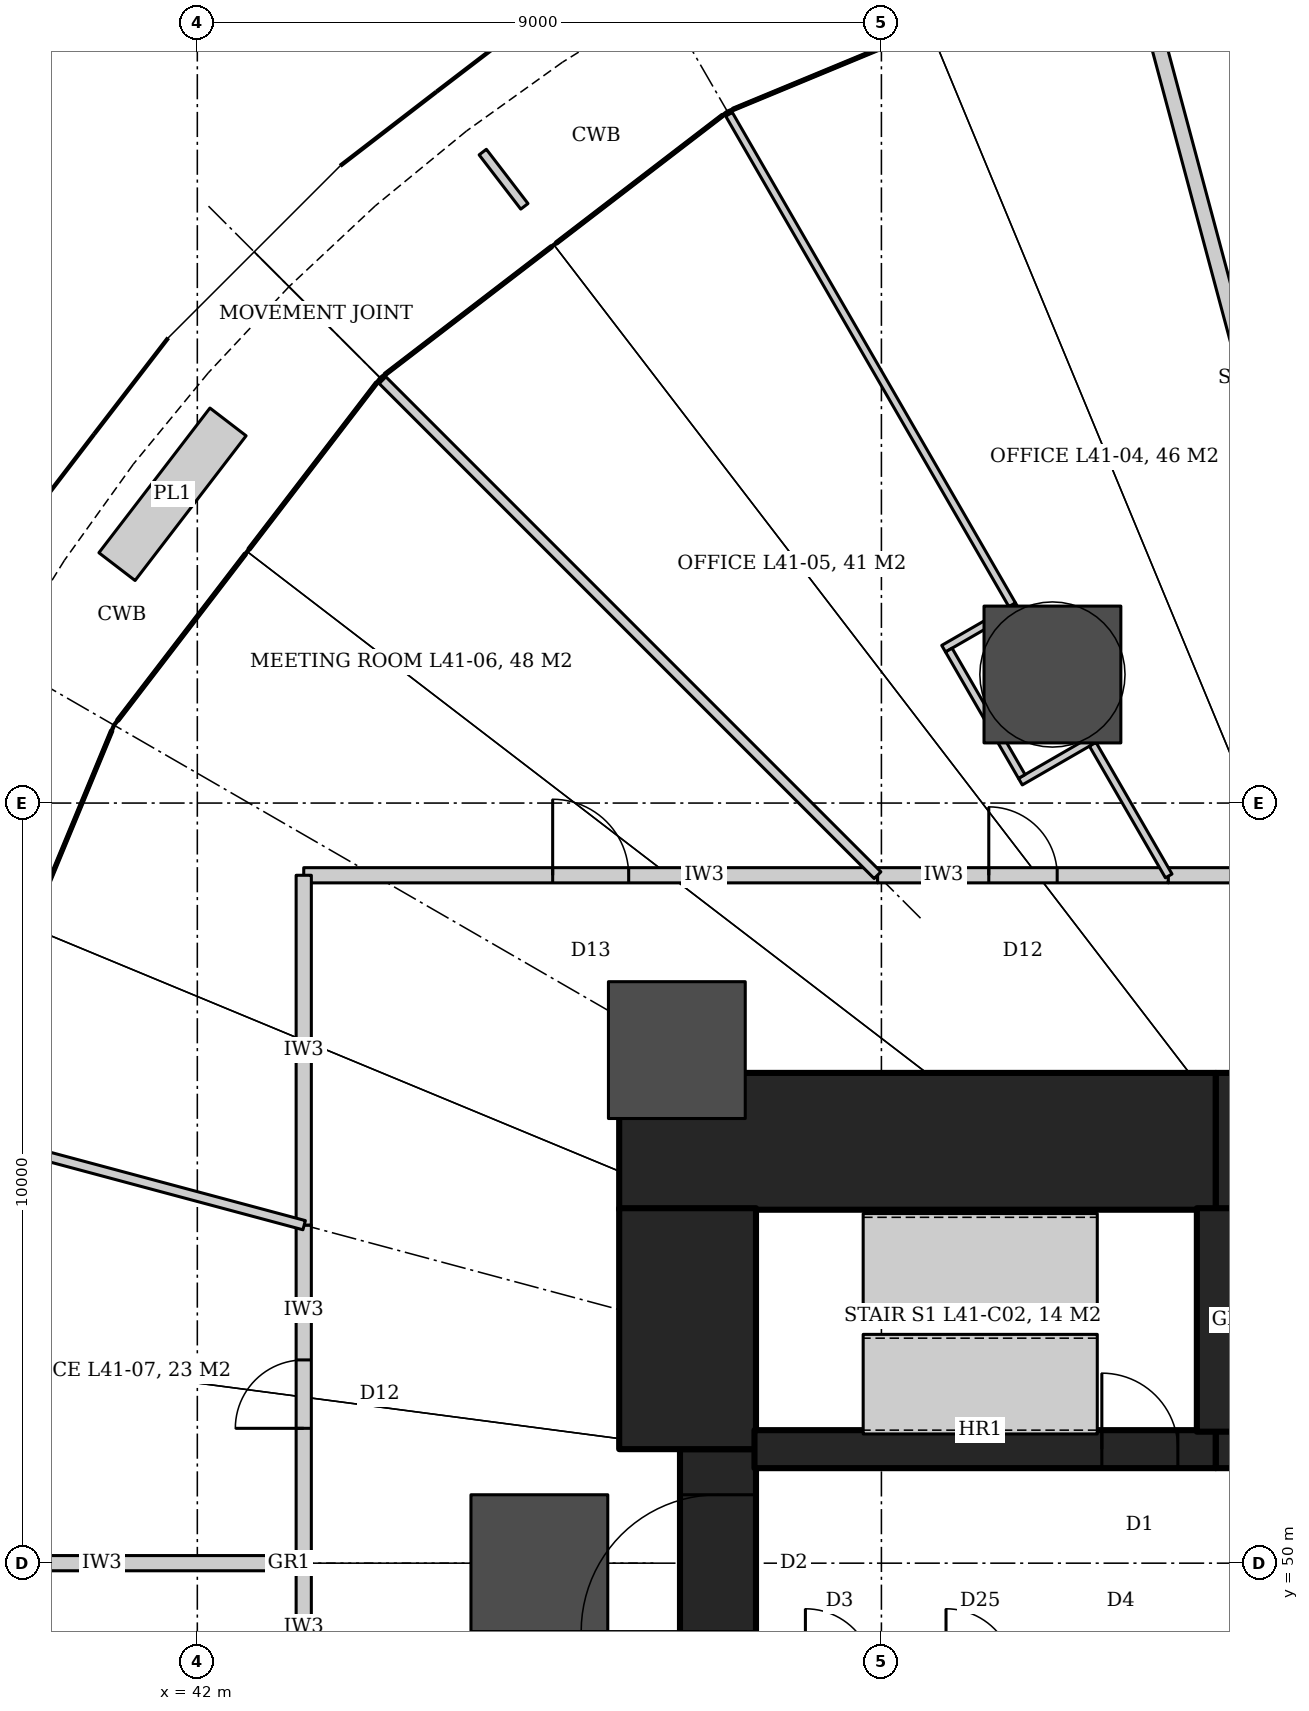
"""IFC4 building model, lengths in metres.
Left out: names, types, materials, properties, quantities, classifications, styles, units other than length and angle.
Written with IfcOpenShell. Run it as: python <this file> out.ifc"""

import sys

from ifc_helpers import new_model, si_unit, direction, frame, frame_2d, origin, origin_2d, place, context, subcontext, project, spatial, rectangle, hollow_circle, extrude, element, fill, save


model = new_model("IFC4")
c1 = context("Model", 3, precision=1e-05, world=origin(), true_north=direction((0.0, 1.0)))
c2 = subcontext(c1, "Body", "Model", "MODEL_VIEW")
j1 = project(units=[si_unit("LENGTHUNIT", "METRE"), si_unit("PLANEANGLEUNIT", "RADIAN")], contexts=[c1])
p1 = place(None, origin())
s1 = spatial("IfcSite", under=j1, at=p1, CompositionType="ELEMENT")
p2 = place(p1, origin())
s2 = spatial("IfcBuilding", under=s1, at=p2, CompositionType="ELEMENT")
p3 = place(p2, frame((0.0, 0.0, 173.0)))
s3 = spatial("IfcBuildingStorey", under=s2, at=p3, CompositionType="ELEMENT", Elevation=173.0)
p4 = place(p3, frame((47.55, 55.55, 0.0), z_axis=(0.0, 0.0, 1.0), x_axis=(1.0, 0.0, 0.0)))
e1 = element("IfcWall", 1, at=p4, inside=s3, PredefinedType="SHEAR", context=c2, shape_type="SweptSolid", body=[
    extrude(rectangle(XDim=7.85, YDim=1.8, at=frame_2d((3.925, 0.0))), origin(), (0.0, 0.0, 1.0), 4.2),
])
p5 = place(p3, frame((55.4, 55.55, 0.0), z_axis=(0.0, 0.0, 1.0), x_axis=(1.0, 0.0, 0.0)))
e2 = element("IfcWall", 2, at=p5, inside=s3, PredefinedType="SHEAR", context=c2, shape_type="SweptSolid", body=[
    extrude(rectangle(XDim=9.2, YDim=1.8, at=frame_2d((4.6, 0.0))), origin(), (0.0, 0.0, 1.0), 4.2),
])
p6 = place(p3, frame((48.45, 48.5, 0.0), z_axis=(0.0, 0.0, 1.0), x_axis=(0.0, 1.0, 0.0)))
e3 = element("IfcWall", 3, at=p6, inside=s3, PredefinedType="SHEAR", context=c2, shape_type="SweptSolid", body=[
    extrude(rectangle(XDim=3.0, YDim=1.8, at=frame_2d((1.5, 0.0))), origin(), (0.0, 0.0, 1.0), 4.2),
])
p7 = place(p6, frame((0.6, 0.0, 0.0)))
e4 = element("IfcOpeningElement", 4, at=p7, cuts=e3, PredefinedType="OPENING", context=c2, shape_type="SweptSolid", body=[
    extrude(rectangle(XDim=1.8, YDim=2.1, at=frame_2d((0.9, 1.05))), frame((0.0, 0.91, 0.0), z_axis=(0.0, -1.0, 0.0), x_axis=(1.0, 0.0, 0.0)), (0.0, 0.0, 1.0), 1.82),
])
p8 = place(p3, frame((48.45, 51.5, 0.0), z_axis=(0.0, 0.0, 1.0), x_axis=(0.0, 1.0, 0.0)))
e5 = element("IfcWall", 5, at=p8, inside=s3, PredefinedType="SHEAR", context=c2, shape_type="SweptSolid", body=[
    extrude(rectangle(XDim=3.17, YDim=1.8, at=frame_2d((1.585, 0.0))), origin(), (0.0, 0.0, 1.0), 4.2),
])
p9 = place(p3, frame((49.33, 51.5, 0.0), z_axis=(0.0, 0.0, 1.0), x_axis=(1.0, 0.0, 0.0)))
e6 = element("IfcWall", 6, at=p9, inside=s3, PredefinedType="SHEAR", context=c2, shape_type="SweptSolid", body=[
    extrude(rectangle(XDim=6.07, YDim=0.4, at=frame_2d((3.035, 0.0))), origin(), (0.0, 0.0, 1.0), 4.2),
])
p10 = place(p9, frame((4.57, 0.0, 0.0)))
e7 = element("IfcOpeningElement", 7, at=p10, cuts=e6, PredefinedType="OPENING", context=c2, shape_type="SweptSolid", body=[
    extrude(rectangle(XDim=1.0, YDim=2.1, at=frame_2d((0.5, 1.05))), frame((0.0, 0.21, 0.0), z_axis=(0.0, -1.0, 0.0), x_axis=(1.0, 0.0, 0.0)), (0.0, 0.0, 1.0), 0.42),
])
p11 = place(p3, frame((55.4, 51.5, 0.0), z_axis=(0.0, 0.0, 1.0), x_axis=(1.0, 0.0, 0.0)))
e8 = element("IfcWall", 8, at=p11, inside=s3, PredefinedType="SHEAR", context=c2, shape_type="SweptSolid", body=[
    extrude(rectangle(XDim=9.2, YDim=0.4, at=frame_2d((4.6, 0.0))), origin(), (0.0, 0.0, 1.0), 4.2),
])
p12 = place(p11, frame((1.7, 0.0, 0.0)))
e9 = element("IfcOpeningElement", 9, at=p12, cuts=e8, PredefinedType="OPENING", context=c2, shape_type="SweptSolid", body=[
    extrude(rectangle(XDim=0.8, YDim=2.1, at=frame_2d((0.4, 1.05))), frame((0.0, 0.21, 0.0), z_axis=(0.0, -1.0, 0.0), x_axis=(1.0, 0.0, 0.0)), (0.0, 0.0, 1.0), 0.42),
])
p13 = place(p11, frame((4.85, 0.0, 0.0)))
e10 = element("IfcOpeningElement", 10, at=p13, cuts=e8, PredefinedType="OPENING", context=c2, shape_type="SweptSolid", body=[
    extrude(rectangle(XDim=0.8, YDim=2.1, at=frame_2d((0.4, 1.05))), frame((0.0, 0.21, 0.0), z_axis=(0.0, -1.0, 0.0), x_axis=(1.0, 0.0, 0.0)), (0.0, 0.0, 1.0), 0.42),
])
p14 = place(p11, frame((7.35, 0.0, 0.0)))
e11 = element("IfcOpeningElement", 11, at=p14, cuts=e8, PredefinedType="OPENING", context=c2, shape_type="SweptSolid", body=[
    extrude(rectangle(XDim=0.8, YDim=2.1, at=frame_2d((0.4, 1.05))), frame((0.0, 0.21, 0.0), z_axis=(0.0, -1.0, 0.0), x_axis=(1.0, 0.0, 0.0)), (0.0, 0.0, 1.0), 0.42),
])
p15 = place(p3, frame((55.4, 51.68, 0.0), z_axis=(0.0, 0.0, 1.0), x_axis=(0.0, 1.0, 0.0)))
e12 = element("IfcWall", 12, at=p15, inside=s3, PredefinedType="SHEAR", context=c2, shape_type="SweptSolid", body=[
    extrude(rectangle(XDim=2.99, YDim=0.4, at=frame_2d((1.495, 0.0))), origin(), (0.0, 0.0, 1.0), 4.2),
])
for number, where, z_axis, x_axis in (
    (13, (53.25, 61.691, 0.0), (0.0, 0.0, 1.0), (1.0, 0.0, 0.0)),
    (14, (48.309, 56.75, 0.0), (0.0, 0.0, 1.0), (1.0, 0.0, 0.0)),
    (15, (46.5, 50.0, 0.0), (0.0, 0.0, 1.0), (1.0, 0.0, 0.0)),
):
    element("IfcColumn", number, at=place(p3, frame(where, z_axis=z_axis, x_axis=x_axis)), inside=s3, PredefinedType="COLUMN", context=c2, shape_type="SweptSolid", body=[
        extrude(hollow_circle(Radius=0.508, WallThickness=0.05, at=origin_2d()), origin(), (0.0, 0.0, 1.0), 4.2),
    ])
p16 = place(p3, frame((43.4, 59.05, 0.0), z_axis=(0.0, 0.0, 1.0), x_axis=(1.0, 0.0, 0.0)))
e16 = element("IfcWall", 16, at=p16, inside=s3, PredefinedType="PARTITIONING", context=c2, shape_type="SweptSolid", body=[
    extrude(rectangle(XDim=7.55, YDim=0.2, at=frame_2d((3.775, 0.0))), origin(), (0.0, 0.0, 1.0), 3.012),
])
p17 = place(p3, frame((50.95, 59.05, 0.0), z_axis=(0.0, 0.0, 1.0), x_axis=(1.0, 0.0, 0.0)))
e17 = element("IfcWall", 17, at=p17, inside=s3, PredefinedType="PARTITIONING", context=c2, shape_type="SweptSolid", body=[
    extrude(rectangle(XDim=3.825, YDim=0.2, at=frame_2d((1.913, 0.0))), origin(), (0.0, 0.0, 1.0), 3.02),
])
p18 = place(p17, frame((1.462, 0.0, 0.0)))
e18 = element("IfcOpeningElement", 18, at=p18, cuts=e17, PredefinedType="OPENING", context=c2, shape_type="SweptSolid", body=[
    extrude(rectangle(XDim=0.9, YDim=2.4, at=frame_2d((0.45, 1.2))), frame((0.0, 0.11, 0.0), z_axis=(0.0, -1.0, 0.0), x_axis=(1.0, 0.0, 0.0)), (0.0, 0.0, 1.0), 0.22),
])
p19 = place(p3, frame((54.775, 59.05, 0.0), z_axis=(0.0, 0.0, 1.0), x_axis=(1.0, 0.0, 0.0)))
e19 = element("IfcWall", 19, at=p19, inside=s3, PredefinedType="PARTITIONING", context=c2, shape_type="SweptSolid", body=[
    extrude(rectangle(XDim=2.8, YDim=0.2, at=frame_2d((1.4, 0.0))), origin(), (0.0, 0.0, 1.0), 3.04),
])
p20 = place(p19, frame((0.95, 0.0, 0.0)))
e20 = element("IfcOpeningElement", 20, at=p20, cuts=e19, PredefinedType="OPENING", context=c2, shape_type="SweptSolid", body=[
    extrude(rectangle(XDim=0.9, YDim=2.4, at=frame_2d((0.45, 1.2))), frame((0.0, 0.11, 0.0), z_axis=(0.0, -1.0, 0.0), x_axis=(1.0, 0.0, 0.0)), (0.0, 0.0, 1.0), 0.22),
])
p21 = place(p3, frame((43.4, 45.552, 0.0), z_axis=(0.0, 0.0, 1.0), x_axis=(0.0, 1.0, 0.0)))
e21 = element("IfcWall", 21, at=p21, inside=s3, PredefinedType="PARTITIONING", context=c2, shape_type="SweptSolid", body=[
    extrude(rectangle(XDim=4.448, YDim=0.2, at=frame_2d((2.224, 0.0))), origin(), (0.0, 0.0, 1.0), 3.012),
])
p22 = place(p21, frame((1.424, 0.0, 0.0)))
e22 = element("IfcOpeningElement", 22, at=p22, cuts=e21, PredefinedType="OPENING", context=c2, shape_type="SweptSolid", body=[
    extrude(rectangle(XDim=1.6, YDim=2.4, at=frame_2d((0.8, 1.2))), frame((0.0, 0.11, 0.0), z_axis=(0.0, -1.0, 0.0), x_axis=(1.0, 0.0, 0.0)), (0.0, 0.0, 1.0), 0.22),
])
p23 = place(p3, frame((43.4, 50.0, 0.0), z_axis=(0.0, 0.0, 1.0), x_axis=(0.0, 1.0, 0.0)))
e23 = element("IfcWall", 23, at=p23, inside=s3, PredefinedType="PARTITIONING", context=c2, shape_type="SweptSolid", body=[
    extrude(rectangle(XDim=9.05, YDim=0.2, at=frame_2d((4.525, 0.0))), origin(), (0.0, 0.0, 1.0), 3.012),
])
p24 = place(p23, frame((4.025, 0.0, 0.0)))
e24 = element("IfcOpeningElement", 24, at=p24, cuts=e23, PredefinedType="OPENING", context=c2, shape_type="SweptSolid", body=[
    extrude(rectangle(XDim=1.0, YDim=2.4, at=frame_2d((0.5, 1.2))), frame((0.0, 0.11, 0.0), z_axis=(0.0, -1.0, 0.0), x_axis=(1.0, 0.0, 0.0)), (0.0, 0.0, 1.0), 0.22),
])
p25 = place(p3, frame((57.577, 59.041, 0.0), z_axis=(0.0, 0.0, 1.0), x_axis=(-0.258808436689, 0.965928668743, 0.0)))
e25 = element("IfcWall", 25, at=p25, inside=s3, PredefinedType="PARTITIONING", context=c2, shape_type="SweptSolid", body=[
    extrude(rectangle(XDim=12.65, YDim=0.2, at=frame_2d((6.325, 0.0))), origin(), (0.0, 0.0, 1.0), 3.012),
])
for number, where, z_axis, x_axis in (
    (26, (53.602, 61.181, 0.0), (0.0, 0.0, 1.0), (-0.866, -0.5, 0.0)),
    (27, (52.984, 62.251, 0.0), (0.0, 0.0, 1.0), (-0.866, -0.5, 0.0)),
):
    element("IfcWall", number, at=place(p3, frame(where, z_axis=z_axis, x_axis=x_axis)), inside=s3, PredefinedType="PARTITIONING", context=c2, shape_type="SweptSolid", body=[
        extrude(rectangle(XDim=0.728, YDim=0.1, at=frame_2d((0.364, 0.0))), origin(), (0.0, 0.0, 1.0), 3.012),
    ])
p26 = place(p3, frame((52.99, 60.885, 0.0), z_axis=(0.0, 0.0, 1.0), x_axis=(-0.499976747263, 0.866038828342, 0.0)))
e28 = element("IfcWall", 28, at=p26, inside=s3, PredefinedType="PARTITIONING", context=c2, shape_type="SweptSolid", body=[
    extrude(rectangle(XDim=1.136, YDim=0.1, at=frame_2d((0.568, 0.0))), origin(), (0.0, 0.0, 1.0), 3.012),
])
p27 = place(p3, frame((54.78, 59.041, 0.0), z_axis=(0.0, 0.0, 1.0), x_axis=(-0.500014005679, 0.866017317451, 0.0)))
e29 = element("IfcWall", 29, at=p27, inside=s3, PredefinedType="PARTITIONING", context=c2, shape_type="SweptSolid", body=[
    extrude(rectangle(XDim=2.392, YDim=0.1, at=frame_2d((1.196, 0.0))), origin(), (0.0, 0.0, 1.0), 3.04),
])
p28 = place(p3, frame((52.916, 62.27, 0.0), z_axis=(0.0, 0.0, 1.0), x_axis=(-0.499997422768, 0.866026891745, 0.0)))
e30 = element("IfcWall", 30, at=p28, inside=s3, PredefinedType="PARTITIONING", context=c2, shape_type="SweptSolid", body=[
    extrude(rectangle(XDim=7.942, YDim=0.1, at=frame_2d((3.971, 0.0))), origin(), (0.0, 0.0, 1.0), 3.012),
])
p29 = place(p3, frame((50.949, 59.051, 0.0), z_axis=(0.0, 0.0, 1.0), x_axis=(-0.707106781187, 0.707106781187, 0.0)))
e31 = element("IfcWall", 31, at=p29, inside=s3, PredefinedType="PARTITIONING", context=c2, shape_type="SweptSolid", body=[
    extrude(rectangle(XDim=9.31, YDim=0.125, at=frame_2d((4.655, 0.0))), origin(), (0.0, 0.0, 1.0), 3.012),
])
p30 = place(p3, frame((43.4, 50.0, 0.0), z_axis=(0.0, 0.0, 1.0), x_axis=(-1.0, 0.0, 0.0)))
e32 = element("IfcWall", 32, at=p30, inside=s3, PredefinedType="PARTITIONING", context=c2, shape_type="SweptSolid", body=[
    extrude(rectangle(XDim=1.81, YDim=0.125, at=frame_2d((0.905, 0.0))), origin(), (0.0, 0.0, 1.0), 3.012),
])
p31 = place(p3, frame((41.45, 50.0, 0.0), z_axis=(0.0, 0.0, 1.0), x_axis=(-0.444556644785, -0.895750740763, 0.0)))
e33 = element("IfcWall", 33, at=p31, inside=s3, PredefinedType="SOLIDWALL", context=c2, shape_type="SweptSolid", body=[
    extrude(rectangle(XDim=6.4, YDim=0.25, at=frame_2d((3.2, 0.0))), origin(), (0.0, 0.0, 1.0), 4.04),
])
p32 = place(p31, frame((2.3, 0.0, 0.0)))
e34 = element("IfcOpeningElement", 34, at=p32, cuts=e33, PredefinedType="OPENING", context=c2, shape_type="SweptSolid", body=[
    extrude(rectangle(XDim=1.8, YDim=2.4, at=frame_2d((0.9, 1.2))), frame((0.0, 0.135, 0.0), z_axis=(0.0, -1.0, 0.0), x_axis=(1.0, 0.0, 0.0)), (0.0, 0.0, 1.0), 0.27),
])
p33 = place(p31, frame((0.7, 0.0, 0.0)))
e35 = element("IfcOpeningElement", 35, at=p33, cuts=e33, PredefinedType="OPENING", context=c2, shape_type="SweptSolid", body=[
    extrude(rectangle(XDim=1.2, YDim=2.4, at=frame_2d((0.6, 1.2))), frame((0.0, 0.135, 0.0), z_axis=(0.0, -1.0, 0.0), x_axis=(1.0, 0.0, 0.0)), (0.0, 0.0, 1.0), 0.27),
])
p34 = place(p31, frame((4.5, 0.0, 0.0)))
e36 = element("IfcOpeningElement", 36, at=p34, cuts=e33, PredefinedType="OPENING", context=c2, shape_type="SweptSolid", body=[
    extrude(rectangle(XDim=1.2, YDim=2.4, at=frame_2d((0.6, 1.2))), frame((0.0, 0.135, 0.0), z_axis=(0.0, -1.0, 0.0), x_axis=(1.0, 0.0, 0.0)), (0.0, 0.0, 1.0), 0.27),
])
p35 = place(p18, origin())
e37 = element("IfcDoor", 37, at=p35, inside=s3, OperationType="SINGLE_SWING_LEFT", PredefinedType="DOOR", context=c2, shape_type="SweptSolid", body=[
    extrude(rectangle(XDim=0.9, YDim=2.4, at=frame_2d((0.45, 1.2))), frame((0.0, 0.025, 0.0), z_axis=(0.0, -1.0, 0.0), x_axis=(1.0, 0.0, 0.0)), (0.0, 0.0, 1.0), 0.05),
])
fill(e18, e37)
p36 = place(p24, origin())
e38 = element("IfcDoor", 38, at=p36, inside=s3, OperationType="SINGLE_SWING_LEFT", PredefinedType="DOOR", context=c2, shape_type="SweptSolid", body=[
    extrude(rectangle(XDim=1.0, YDim=2.4, at=frame_2d((0.5, 1.2))), frame((0.0, 0.025, 0.0), z_axis=(0.0, -1.0, 0.0), x_axis=(1.0, 0.0, 0.0)), (0.0, 0.0, 1.0), 0.05),
])
fill(e24, e38)
p37 = place(p33, origin())
e39 = element("IfcWindow", 39, at=p37, inside=s3, PartitioningType="SINGLE_PANEL", PredefinedType="WINDOW", context=c2, shape_type="SweptSolid", body=[
    extrude(rectangle(XDim=1.2, YDim=2.4, at=frame_2d((0.6, 1.2))), frame((0.0, 0.03, 0.0), z_axis=(0.0, -1.0, 0.0), x_axis=(1.0, 0.0, 0.0)), (0.0, 0.0, 1.0), 0.06),
])
fill(e35, e39)
p38 = place(p10, origin())
e40 = element("IfcDoor", 40, at=p38, inside=s3, OperationType="SINGLE_SWING_LEFT", PredefinedType="DOOR", context=c2, shape_type="SweptSolid", body=[
    extrude(rectangle(XDim=1.0, YDim=2.1, at=frame_2d((0.5, 1.05))), frame((0.0, 0.025, 0.0), z_axis=(0.0, -1.0, 0.0), x_axis=(1.0, 0.0, 0.0)), (0.0, 0.0, 1.0), 0.05),
])
fill(e7, e40)
p39 = place(p7, origin())
e41 = element("IfcDoor", 41, at=p39, inside=s3, OperationType="DOUBLE_DOOR_DOUBLE_SWING", PredefinedType="DOOR", context=c2, shape_type="SweptSolid", body=[
    extrude(rectangle(XDim=1.8, YDim=2.1, at=frame_2d((0.9, 1.05))), frame((0.0, 0.025, 0.0), z_axis=(0.0, -1.0, 0.0), x_axis=(1.0, 0.0, 0.0)), (0.0, 0.0, 1.0), 0.05),
])
fill(e4, e41)
save(model, sys.argv[1])
